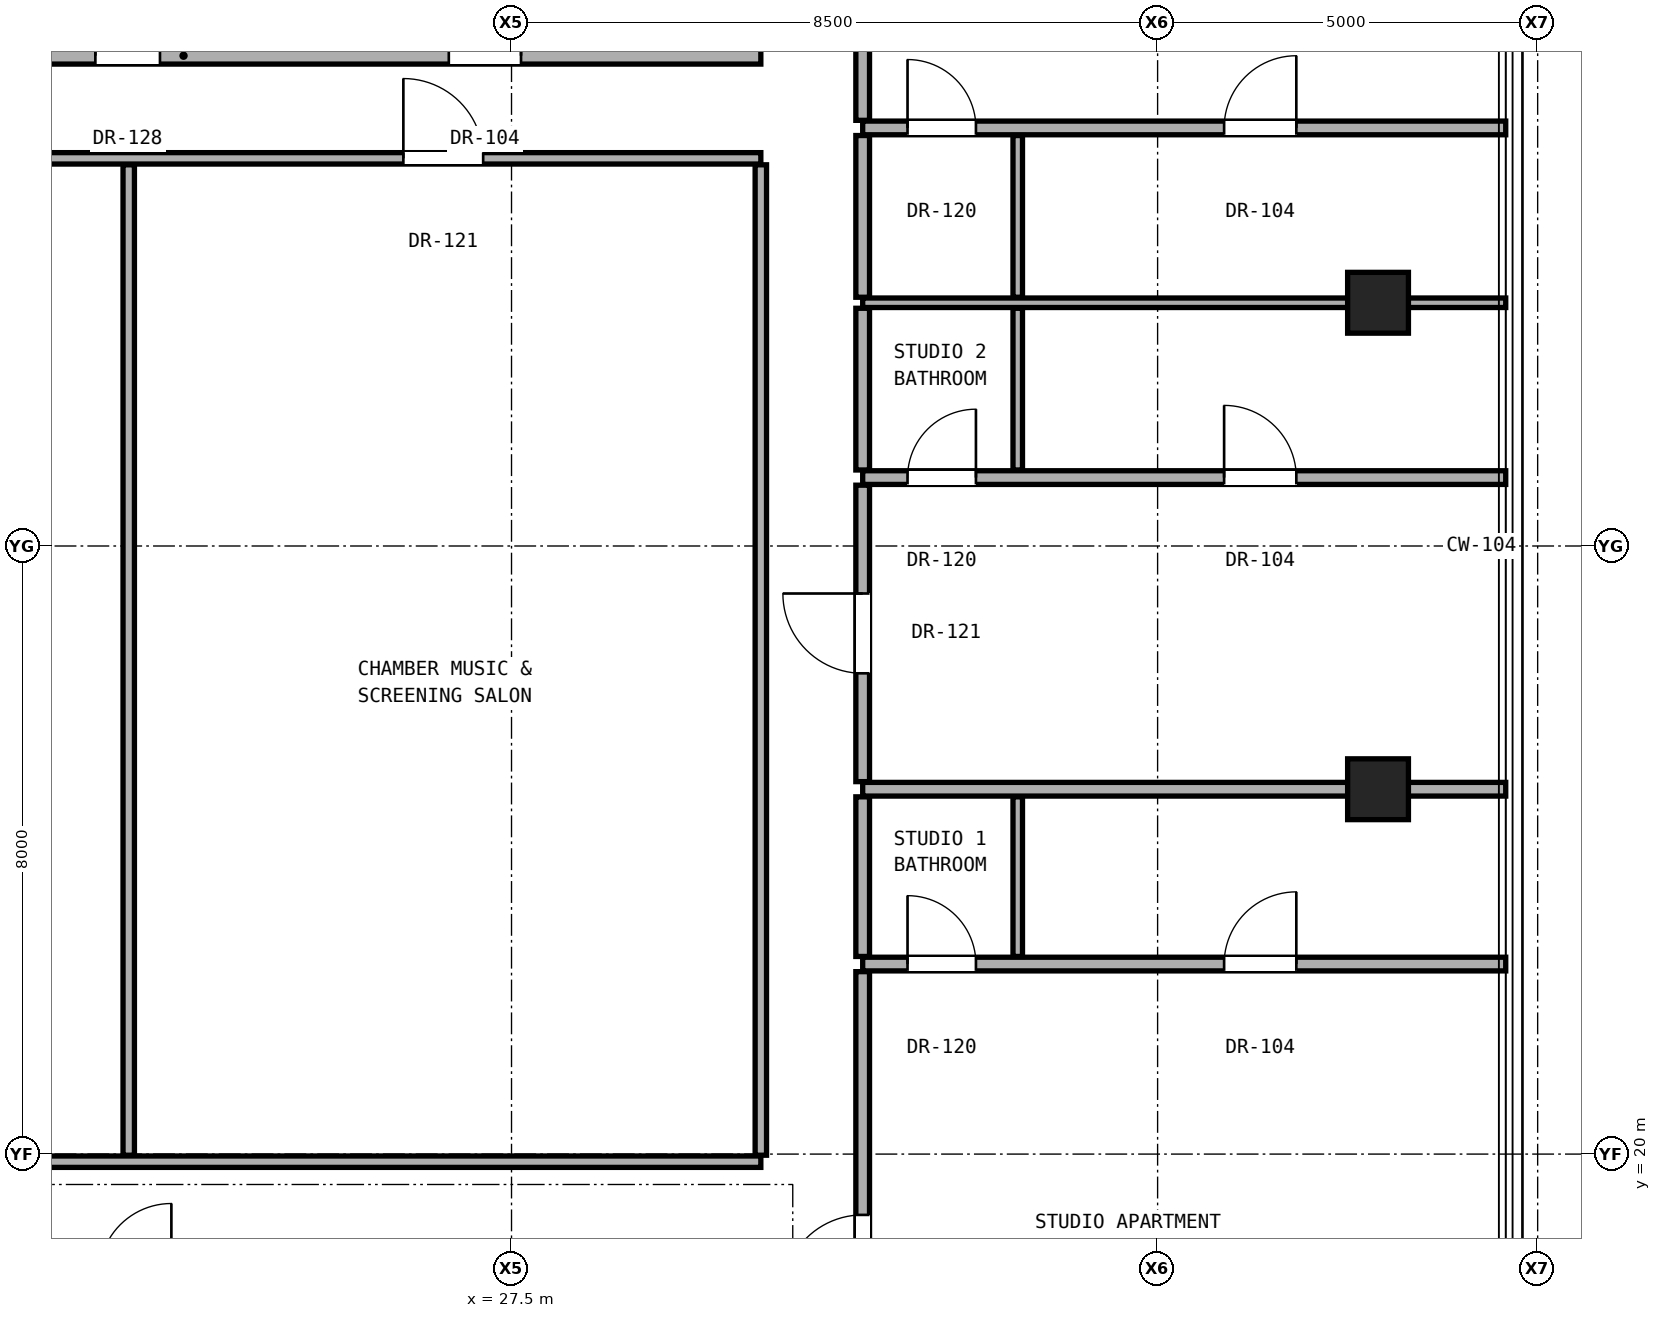
"""IFC4 building model, lengths in metres.
Left out: names, types, materials, properties, quantities, classifications, styles, units other than length and angle.
Written with IfcOpenShell. Run it as: python <this file> out.ifc"""

import sys

from ifc_helpers import new_model, si_unit, direction, frame, frame_2d, origin, origin_2d, place, context, subcontext, project, spatial, rectangle, hollow_rectangle, extrude, element, fill, save


model = new_model("IFC4")
c1 = context("Model", 3, precision=1e-05, world=origin(), true_north=direction((0.0, 1.0)))
c2 = subcontext(c1, "Body", "Model", "MODEL_VIEW")
j1 = project(units=[si_unit("LENGTHUNIT", "METRE"), si_unit("PLANEANGLEUNIT", "RADIAN")], contexts=[c1])
p1 = place(None, origin())
s1 = spatial("IfcSite", under=j1, at=p1, CompositionType="ELEMENT")
p2 = place(p1, origin())
s2 = spatial("IfcBuilding", under=s1, at=p2, CompositionType="ELEMENT")
p3 = place(p2, frame((0.0, 0.0, 219.4)))
s3 = spatial("IfcBuildingStorey", under=s2, at=p3, CompositionType="ELEMENT", Elevation=219.4)
for number, where, z_axis, x_axis in (
    (1, (38.9, 24.8, 0.0), (0.0, 0.0, 1.0), (1.0, 0.0, 0.0)),
    (2, (38.9, 31.2, 0.0), (0.0, 0.0, 1.0), (1.0, 0.0, 0.0)),
):
    element("IfcColumn", number, at=place(p3, frame(where, z_axis=z_axis, x_axis=x_axis)), inside=s3, PredefinedType="COLUMN", context=c2, shape_type="SweptSolid", body=[
        extrude(hollow_rectangle(XDim=0.8, YDim=0.8, WallThickness=0.045, at=origin_2d()), origin(), (0.0, 0.0, 1.0), 3.3),
    ])
p4 = place(p3, frame((10.22, 19.9, 0.0), z_axis=(0.0, 0.0, 1.0), x_axis=(1.0, 0.0, 0.0)))
e3 = element("IfcWall", 3, at=p4, inside=s3, PredefinedType="PARTITIONING", context=c2, shape_type="SweptSolid", body=[
    extrude(rectangle(XDim=20.56, YDim=0.15, at=frame_2d((10.28, 0.0))), origin(), (0.0, 0.0, 1.0), 2.236),
])
p5 = place(p4, frame((1.36, 0.0, 0.0)))
e4 = element("IfcOpeningElement", 4, at=p5, cuts=e3, PredefinedType="OPENING", context=c2, shape_type="SweptSolid", body=[
    extrude(rectangle(XDim=0.9, YDim=2.1, at=frame_2d((0.45, 1.05))), frame((0.0, 0.085, 0.0), z_axis=(0.0, -1.0, 0.0), x_axis=(1.0, 0.0, 0.0)), (0.0, 0.0, 1.0), 0.17),
])
p6 = place(p4, frame((3.87, 0.0, 0.0)))
e5 = element("IfcOpeningElement", 5, at=p6, cuts=e3, PredefinedType="OPENING", context=c2, shape_type="SweptSolid", body=[
    extrude(rectangle(XDim=0.95, YDim=2.15, at=frame_2d((0.475, 1.075))), frame((0.0, 0.085, 0.0), z_axis=(0.0, -1.0, 0.0), x_axis=(1.0, 0.0, 0.0)), (0.0, 0.0, 1.0), 0.17),
])
p7 = place(p4, frame((8.452, 0.0, 0.0)))
e6 = element("IfcOpeningElement", 6, at=p7, cuts=e3, PredefinedType="OPENING", context=c2, shape_type="SweptSolid", body=[
    extrude(rectangle(XDim=1.05, YDim=2.2, at=frame_2d((0.525, 1.1))), frame((0.0, 0.085, 0.0), z_axis=(0.0, -1.0, 0.0), x_axis=(1.0, 0.0, 0.0)), (0.0, 0.0, 1.0), 0.17),
])
p8 = place(p3, frame((32.12, 22.5, 0.0), z_axis=(0.0, 0.0, 1.0), x_axis=(1.0, 0.0, 0.0)))
e7 = element("IfcWall", 7, at=p8, inside=s3, PredefinedType="PARTITIONING", context=c2, shape_type="SweptSolid", body=[
    extrude(rectangle(XDim=8.46, YDim=0.18, at=frame_2d((4.23, 0.0))), origin(), (0.0, 0.0, 1.0), 2.319),
])
p9 = place(p8, frame((4.755, 0.0, 0.0)))
e8 = element("IfcOpeningElement", 8, at=p9, cuts=e7, PredefinedType="OPENING", context=c2, shape_type="SweptSolid", body=[
    extrude(rectangle(XDim=0.95, YDim=2.15, at=frame_2d((0.475, 1.075))), frame((0.0, 0.1, 0.0), z_axis=(0.0, -1.0, 0.0), x_axis=(1.0, 0.0, 0.0)), (0.0, 0.0, 1.0), 0.2),
])
p10 = place(p8, frame((0.59, 0.0, 0.0)))
e9 = element("IfcOpeningElement", 9, at=p10, cuts=e7, PredefinedType="OPENING", context=c2, shape_type="SweptSolid", body=[
    extrude(rectangle(XDim=0.9, YDim=2.1, at=frame_2d((0.45, 1.05))), frame((0.0, 0.1, 0.0), z_axis=(0.0, -1.0, 0.0), x_axis=(1.0, 0.0, 0.0)), (0.0, 0.0, 1.0), 0.2),
])
p11 = place(p3, frame((32.12, 24.8, 0.0), z_axis=(0.0, 0.0, 1.0), x_axis=(1.0, 0.0, 0.0)))
e10 = element("IfcWall", 10, at=p11, inside=s3, PredefinedType="PARTITIONING", context=c2, shape_type="SweptSolid", body=[
    extrude(rectangle(XDim=8.46, YDim=0.18, at=frame_2d((4.23, 0.0))), origin(), (0.0, 0.0, 1.0), 2.319),
])
p12 = place(p3, frame((32.12, 28.9, 0.0), z_axis=(0.0, 0.0, 1.0), x_axis=(1.0, 0.0, 0.0)))
e11 = element("IfcWall", 11, at=p12, inside=s3, PredefinedType="PARTITIONING", context=c2, shape_type="SweptSolid", body=[
    extrude(rectangle(XDim=8.46, YDim=0.18, at=frame_2d((4.23, 0.0))), origin(), (0.0, 0.0, 1.0), 2.319),
])
p13 = place(p12, frame((4.755, 0.0, 0.0)))
e12 = element("IfcOpeningElement", 12, at=p13, cuts=e11, PredefinedType="OPENING", context=c2, shape_type="SweptSolid", body=[
    extrude(rectangle(XDim=0.95, YDim=2.15, at=frame_2d((0.475, 1.075))), frame((0.0, 0.1, 0.0), z_axis=(0.0, -1.0, 0.0), x_axis=(1.0, 0.0, 0.0)), (0.0, 0.0, 1.0), 0.2),
])
p14 = place(p12, frame((0.59, 0.0, 0.0)))
e13 = element("IfcOpeningElement", 13, at=p14, cuts=e11, PredefinedType="OPENING", context=c2, shape_type="SweptSolid", body=[
    extrude(rectangle(XDim=0.9, YDim=2.1, at=frame_2d((0.45, 1.05))), frame((0.0, 0.1, 0.0), z_axis=(0.0, -1.0, 0.0), x_axis=(1.0, 0.0, 0.0)), (0.0, 0.0, 1.0), 0.2),
])
p15 = place(p3, frame((32.12, 31.2, 0.0), z_axis=(0.0, 0.0, 1.0), x_axis=(1.0, 0.0, 0.0)))
e14 = element("IfcWall", 14, at=p15, inside=s3, PredefinedType="PARTITIONING", context=c2, shape_type="SweptSolid", body=[
    extrude(rectangle(XDim=8.46, YDim=0.125, at=frame_2d((4.23, 0.0))), origin(), (0.0, 0.0, 1.0), 2.319),
])
p16 = place(p3, frame((10.22, 33.1, 0.0), z_axis=(0.0, 0.0, 1.0), x_axis=(1.0, 0.0, 0.0)))
e15 = element("IfcWall", 15, at=p16, inside=s3, PredefinedType="PARTITIONING", context=c2, shape_type="SweptSolid", body=[
    extrude(rectangle(XDim=20.56, YDim=0.15, at=frame_2d((10.28, 0.0))), origin(), (0.0, 0.0, 1.0), 2.236),
])
p17 = place(p16, frame((15.857, 0.0, 0.0)))
e16 = element("IfcOpeningElement", 16, at=p17, cuts=e15, PredefinedType="OPENING", context=c2, shape_type="SweptSolid", body=[
    extrude(rectangle(XDim=1.05, YDim=2.2, at=frame_2d((0.525, 1.1))), frame((0.0, 0.085, 0.0), z_axis=(0.0, -1.0, 0.0), x_axis=(1.0, 0.0, 0.0)), (0.0, 0.0, 1.0), 0.17),
])
p18 = place(p3, frame((32.12, 33.5, 0.0), z_axis=(0.0, 0.0, 1.0), x_axis=(1.0, 0.0, 0.0)))
e17 = element("IfcWall", 17, at=p18, inside=s3, PredefinedType="PARTITIONING", context=c2, shape_type="SweptSolid", body=[
    extrude(rectangle(XDim=8.46, YDim=0.18, at=frame_2d((4.23, 0.0))), origin(), (0.0, 0.0, 1.0), 2.319),
])
p19 = place(p18, frame((4.755, 0.0, 0.0)))
e18 = element("IfcOpeningElement", 18, at=p19, cuts=e17, PredefinedType="OPENING", context=c2, shape_type="SweptSolid", body=[
    extrude(rectangle(XDim=0.95, YDim=2.15, at=frame_2d((0.475, 1.075))), frame((0.0, 0.1, 0.0), z_axis=(0.0, -1.0, 0.0), x_axis=(1.0, 0.0, 0.0)), (0.0, 0.0, 1.0), 0.2),
])
p20 = place(p18, frame((0.59, 0.0, 0.0)))
e19 = element("IfcOpeningElement", 19, at=p20, cuts=e17, PredefinedType="OPENING", context=c2, shape_type="SweptSolid", body=[
    extrude(rectangle(XDim=0.9, YDim=2.1, at=frame_2d((0.45, 1.05))), frame((0.0, 0.1, 0.0), z_axis=(0.0, -1.0, 0.0), x_axis=(1.0, 0.0, 0.0)), (0.0, 0.0, 1.0), 0.2),
])
p21 = place(p3, frame((15.59, 34.45, 0.0), z_axis=(0.0, 0.0, 1.0), x_axis=(1.0, 0.0, 0.0)))
e20 = element("IfcWall", 20, at=p21, inside=s3, PredefinedType="SOLIDWALL", context=c2, shape_type="SweptSolid", body=[
    extrude(rectangle(XDim=15.19, YDim=0.22, at=frame_2d((7.595, 0.0))), origin(), (0.0, 0.0, 1.0), 2.236),
])
p22 = place(p21, frame((6.435, 0.0, 0.0)))
e21 = element("IfcOpeningElement", 21, at=p22, cuts=e20, PredefinedType="OPENING", context=c2, shape_type="SweptSolid", body=[
    extrude(rectangle(XDim=0.85, YDim=2.01, at=frame_2d((0.425, 1.005))), frame((0.0, 0.12, 0.0), z_axis=(0.0, -1.0, 0.0), x_axis=(1.0, 0.0, 0.0)), (0.0, 0.0, 1.0), 0.24),
])
p23 = place(p21, frame((11.085, 0.0, 0.0)))
e22 = element("IfcOpeningElement", 22, at=p23, cuts=e20, PredefinedType="OPENING", context=c2, shape_type="SweptSolid", body=[
    extrude(rectangle(XDim=0.95, YDim=2.15, at=frame_2d((0.475, 1.075))), frame((0.0, 0.12, 0.0), z_axis=(0.0, -1.0, 0.0), x_axis=(1.0, 0.0, 0.0)), (0.0, 0.0, 1.0), 0.24),
])
p24 = place(p21, frame((1.775, 0.0, 0.0)))
e23 = element("IfcOpeningElement", 23, at=p24, cuts=e20, PredefinedType="OPENING", context=c2, shape_type="SweptSolid", body=[
    extrude(rectangle(XDim=0.85, YDim=2.01, at=frame_2d((0.425, 1.005))), frame((0.0, 0.12, 0.0), z_axis=(0.0, -1.0, 0.0), x_axis=(1.0, 0.0, 0.0)), (0.0, 0.0, 1.0), 0.24),
])
p25 = place(p3, frame((22.464, 19.985, 0.0), z_axis=(0.0, 0.0, 1.0), x_axis=(0.0, 1.0, 0.0)))
e24 = element("IfcWall", 24, at=p25, inside=s3, PredefinedType="PARTITIONING", context=c2, shape_type="SweptSolid", body=[
    extrude(rectangle(XDim=13.03, YDim=0.15, at=frame_2d((6.515, 0.0))), origin(), (0.0, 0.0, 1.0), 2.236),
])
p26 = place(p3, frame((30.78, 19.985, 0.0), z_axis=(0.0, 0.0, 1.0), x_axis=(0.0, 1.0, 0.0)))
e25 = element("IfcWall", 25, at=p26, inside=s3, PredefinedType="PARTITIONING", context=c2, shape_type="SweptSolid", body=[
    extrude(rectangle(XDim=13.03, YDim=0.15, at=frame_2d((6.515, 0.0))), origin(), (0.0, 0.0, 1.0), 2.396),
])
p27 = place(p3, frame((32.12, 14.95, 0.0), z_axis=(0.0, 0.0, 1.0), x_axis=(0.0, 1.0, 0.0)))
e26 = element("IfcWall", 26, at=p27, inside=s3, PredefinedType="PARTITIONING", context=c2, shape_type="SweptSolid", body=[
    extrude(rectangle(XDim=7.45, YDim=0.18, at=frame_2d((3.725, 0.0))), origin(), (0.0, 0.0, 1.0), 2.492),
])
p28 = place(p27, frame((3.2, 0.0, 0.0)))
e27 = element("IfcOpeningElement", 27, at=p28, cuts=e26, PredefinedType="OPENING", context=c2, shape_type="SweptSolid", body=[
    extrude(rectangle(XDim=1.05, YDim=2.2, at=frame_2d((0.525, 1.1))), frame((0.0, 0.1, 0.0), z_axis=(0.0, -1.0, 0.0), x_axis=(1.0, 0.0, 0.0)), (0.0, 0.0, 1.0), 0.2),
])
p29 = place(p3, frame((32.12, 22.6, 0.0), z_axis=(0.0, 0.0, 1.0), x_axis=(0.0, 1.0, 0.0)))
e28 = element("IfcWall", 28, at=p29, inside=s3, PredefinedType="PARTITIONING", context=c2, shape_type="SweptSolid", body=[
    extrude(rectangle(XDim=2.1, YDim=0.18, at=frame_2d((1.05, 0.0))), origin(), (0.0, 0.0, 1.0), 2.396),
])
p30 = place(p3, frame((32.12, 24.9, 0.0), z_axis=(0.0, 0.0, 1.0), x_axis=(0.0, 1.0, 0.0)))
e29 = element("IfcWall", 29, at=p30, inside=s3, PredefinedType="PARTITIONING", context=c2, shape_type="SweptSolid", body=[
    extrude(rectangle(XDim=3.9, YDim=0.18, at=frame_2d((1.95, 0.0))), origin(), (0.0, 0.0, 1.0), 2.396),
])
p31 = place(p30, frame((1.425, 0.0, 0.0)))
e30 = element("IfcOpeningElement", 30, at=p31, cuts=e29, PredefinedType="OPENING", context=c2, shape_type="SweptSolid", body=[
    extrude(rectangle(XDim=1.05, YDim=2.2, at=frame_2d((0.525, 1.1))), frame((0.0, 0.1, 0.0), z_axis=(0.0, -1.0, 0.0), x_axis=(1.0, 0.0, 0.0)), (0.0, 0.0, 1.0), 0.2),
])
for number, where, z_axis, x_axis in (
    (31, (32.12, 29.0, 0.0), (0.0, 0.0, 1.0), (0.0, 1.0, 0.0)),
    (32, (32.12, 31.272, 0.0), (0.0, 0.0, 1.0), (0.0, 1.0, 0.0)),
):
    element("IfcWall", number, at=place(p3, frame(where, z_axis=z_axis, x_axis=x_axis)), inside=s3, PredefinedType="PARTITIONING", context=c2, shape_type="SweptSolid", body=[
        extrude(rectangle(XDim=2.127, YDim=0.18, at=frame_2d((1.064, 0.0))), origin(), (0.0, 0.0, 1.0), 2.396),
    ])
p32 = place(p3, frame((32.12, 33.6, 0.0), z_axis=(0.0, 0.0, 1.0), x_axis=(0.0, 1.0, 0.0)))
e33 = element("IfcWall", 33, at=p32, inside=s3, PredefinedType="PARTITIONING", context=c2, shape_type="SweptSolid", body=[
    extrude(rectangle(XDim=7.45, YDim=0.18, at=frame_2d((3.725, 0.0))), origin(), (0.0, 0.0, 1.0), 2.492),
])
p33 = place(p32, frame((3.2, 0.0, 0.0)))
e34 = element("IfcOpeningElement", 34, at=p33, cuts=e33, PredefinedType="OPENING", context=c2, shape_type="SweptSolid", body=[
    extrude(rectangle(XDim=1.05, YDim=2.2, at=frame_2d((0.525, 1.1))), frame((0.0, 0.1, 0.0), z_axis=(0.0, -1.0, 0.0), x_axis=(1.0, 0.0, 0.0)), (0.0, 0.0, 1.0), 0.2),
])
p34 = place(p3, frame((34.16, 22.6, 0.0), z_axis=(0.0, 0.0, 1.0), x_axis=(0.0, 1.0, 0.0)))
e35 = element("IfcWall", 35, at=p34, inside=s3, PredefinedType="PARTITIONING", context=c2, shape_type="SweptSolid", body=[
    extrude(rectangle(XDim=2.1, YDim=0.125, at=frame_2d((1.05, 0.0))), origin(), (0.0, 0.0, 1.0), 2.396),
])
for number, where, z_axis, x_axis in (
    (36, (34.16, 29.0, 0.0), (0.0, 0.0, 1.0), (0.0, 1.0, 0.0)),
    (37, (34.16, 31.272, 0.0), (0.0, 0.0, 1.0), (0.0, 1.0, 0.0)),
):
    element("IfcWall", number, at=place(p3, frame(where, z_axis=z_axis, x_axis=x_axis)), inside=s3, PredefinedType="PARTITIONING", context=c2, shape_type="SweptSolid", body=[
        extrude(rectangle(XDim=2.127, YDim=0.125, at=frame_2d((1.064, 0.0))), origin(), (0.0, 0.0, 1.0), 2.396),
    ])
p35 = place(p22, origin())
e38 = element("IfcDoor", 38, at=p35, inside=s3, OperationType="SINGLE_SWING_LEFT", PredefinedType="DOOR", context=c2, shape_type="SweptSolid", body=[
    extrude(rectangle(XDim=0.85, YDim=2.01, at=frame_2d((0.425, 1.005))), frame((0.0, 0.025, 0.0), z_axis=(0.0, -1.0, 0.0), x_axis=(1.0, 0.0, 0.0)), (0.0, 0.0, 1.0), 0.05),
])
fill(e21, e38)
p36 = place(p23, origin())
e39 = element("IfcDoor", 39, at=p36, inside=s3, OperationType="SINGLE_SWING_RIGHT", PredefinedType="DOOR", context=c2, shape_type="SweptSolid", body=[
    extrude(rectangle(XDim=0.95, YDim=2.15, at=frame_2d((0.475, 1.075))), frame((0.0, 0.025, 0.0), z_axis=(0.0, -1.0, 0.0), x_axis=(1.0, 0.0, 0.0)), (0.0, 0.0, 1.0), 0.05),
])
fill(e22, e39)
p37 = place(p28, origin())
e40 = element("IfcDoor", 40, at=p37, inside=s3, OperationType="SINGLE_SWING_LEFT", PredefinedType="DOOR", context=c2, shape_type="SweptSolid", body=[
    extrude(rectangle(XDim=1.05, YDim=2.2, at=frame_2d((0.525, 1.1))), frame((0.0, 0.025, 0.0), z_axis=(0.0, -1.0, 0.0), x_axis=(1.0, 0.0, 0.0)), (0.0, 0.0, 1.0), 0.05),
])
fill(e27, e40)
p38 = place(p9, origin())
e41 = element("IfcDoor", 41, at=p38, inside=s3, OperationType="SINGLE_SWING_RIGHT", PredefinedType="DOOR", context=c2, shape_type="SweptSolid", body=[
    extrude(rectangle(XDim=0.95, YDim=2.15, at=frame_2d((0.475, 1.075))), frame((0.0, 0.025, 0.0), z_axis=(0.0, -1.0, 0.0), x_axis=(1.0, 0.0, 0.0)), (0.0, 0.0, 1.0), 0.05),
])
fill(e8, e41)
p39 = place(p10, origin())
e42 = element("IfcDoor", 42, at=p39, inside=s3, OperationType="SINGLE_SWING_LEFT", PredefinedType="DOOR", context=c2, shape_type="SweptSolid", body=[
    extrude(rectangle(XDim=0.9, YDim=2.1, at=frame_2d((0.45, 1.05))), frame((0.0, 0.025, 0.0), z_axis=(0.0, -1.0, 0.0), x_axis=(1.0, 0.0, 0.0)), (0.0, 0.0, 1.0), 0.05),
])
fill(e9, e42)
p40 = place(p31, origin())
e43 = element("IfcDoor", 43, at=p40, inside=s3, OperationType="SINGLE_SWING_RIGHT", PredefinedType="DOOR", context=c2, shape_type="SweptSolid", body=[
    extrude(rectangle(XDim=1.05, YDim=2.2, at=frame_2d((0.525, 1.1))), frame((0.0, 0.025, 0.0), z_axis=(0.0, -1.0, 0.0), x_axis=(1.0, 0.0, 0.0)), (0.0, 0.0, 1.0), 0.05),
])
fill(e30, e43)
p41 = place(p13, origin())
e44 = element("IfcDoor", 44, at=p41, inside=s3, OperationType="SINGLE_SWING_LEFT", PredefinedType="DOOR", context=c2, shape_type="SweptSolid", body=[
    extrude(rectangle(XDim=0.95, YDim=2.15, at=frame_2d((0.475, 1.075))), frame((0.0, 0.025, 0.0), z_axis=(0.0, -1.0, 0.0), x_axis=(1.0, 0.0, 0.0)), (0.0, 0.0, 1.0), 0.05),
])
fill(e12, e44)
p42 = place(p14, origin())
e45 = element("IfcDoor", 45, at=p42, inside=s3, OperationType="SINGLE_SWING_RIGHT", PredefinedType="DOOR", context=c2, shape_type="SweptSolid", body=[
    extrude(rectangle(XDim=0.9, YDim=2.1, at=frame_2d((0.45, 1.05))), frame((0.0, 0.025, 0.0), z_axis=(0.0, -1.0, 0.0), x_axis=(1.0, 0.0, 0.0)), (0.0, 0.0, 1.0), 0.05),
])
fill(e13, e45)
p43 = place(p19, origin())
e46 = element("IfcDoor", 46, at=p43, inside=s3, OperationType="SINGLE_SWING_RIGHT", PredefinedType="DOOR", context=c2, shape_type="SweptSolid", body=[
    extrude(rectangle(XDim=0.95, YDim=2.15, at=frame_2d((0.475, 1.075))), frame((0.0, 0.025, 0.0), z_axis=(0.0, -1.0, 0.0), x_axis=(1.0, 0.0, 0.0)), (0.0, 0.0, 1.0), 0.05),
])
fill(e18, e46)
p44 = place(p20, origin())
e47 = element("IfcDoor", 47, at=p44, inside=s3, OperationType="SINGLE_SWING_LEFT", PredefinedType="DOOR", context=c2, shape_type="SweptSolid", body=[
    extrude(rectangle(XDim=0.9, YDim=2.1, at=frame_2d((0.45, 1.05))), frame((0.0, 0.025, 0.0), z_axis=(0.0, -1.0, 0.0), x_axis=(1.0, 0.0, 0.0)), (0.0, 0.0, 1.0), 0.05),
])
fill(e19, e47)
p45 = place(p17, origin())
e48 = element("IfcDoor", 48, at=p45, inside=s3, OperationType="SINGLE_SWING_LEFT", PredefinedType="DOOR", context=c2, shape_type="SweptSolid", body=[
    extrude(rectangle(XDim=1.05, YDim=2.2, at=frame_2d((0.525, 1.1))), frame((0.0, 0.025, 0.0), z_axis=(0.0, -1.0, 0.0), x_axis=(1.0, 0.0, 0.0)), (0.0, 0.0, 1.0), 0.05),
])
fill(e16, e48)
save(model, sys.argv[1])
